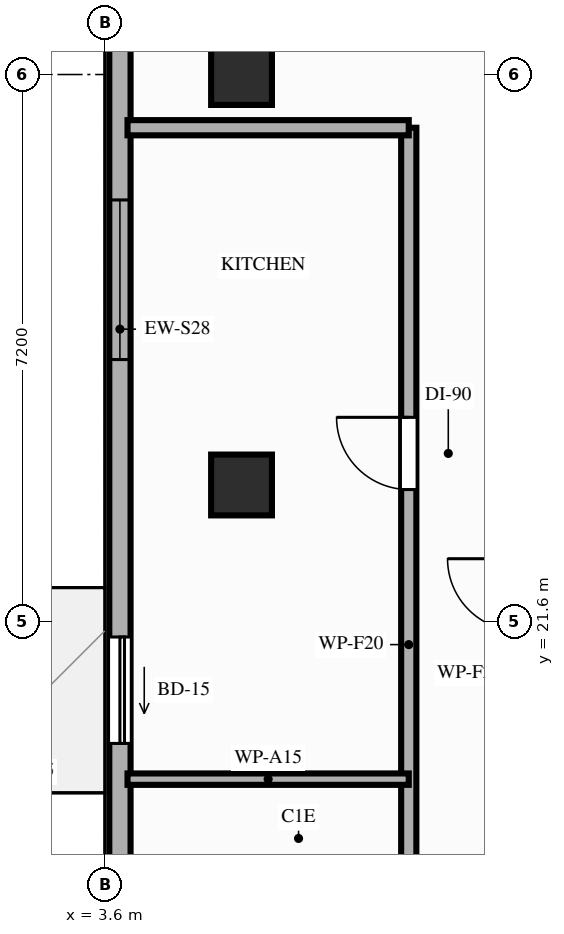
"""IFC4 building model, lengths in metres.
Left out: names, types, materials, properties, quantities, classifications, styles, units other than length and angle.
Written with IfcOpenShell. Run it as: python <this file> out.ifc"""

import sys

from ifc_helpers import new_model, si_unit, direction, frame, frame_2d, origin, origin_2d, place, context, subcontext, project, spatial, rectangle, extrude, element, fill, save


model = new_model("IFC4")
c1 = context("Model", 3, precision=1e-05, world=origin(), true_north=direction((0.0, 1.0)))
c2 = subcontext(c1, "Body", "Model", "MODEL_VIEW")
j1 = project(units=[si_unit("LENGTHUNIT", "METRE"), si_unit("PLANEANGLEUNIT", "RADIAN")], contexts=[c1])
p1 = place(None, origin())
s1 = spatial("IfcSite", under=j1, at=p1, CompositionType="ELEMENT")
p2 = place(p1, origin())
s2 = spatial("IfcBuilding", under=s1, at=p2, CompositionType="ELEMENT")
p3 = place(p2, frame((0.0, 0.0, 231.2)))
s3 = spatial("IfcBuildingStorey", under=s2, at=p3, CompositionType="ELEMENT", Elevation=231.2)
for number, where, z_axis, x_axis in (
    (1, (5.4, 23.4, 0.0), (0.0, 0.0, 1.0), (1.0, 0.0, 0.0)),
    (2, (5.4, 28.8, 0.0), (0.0, 0.0, 1.0), (1.0, 0.0, 0.0)),
):
    element("IfcColumn", number, at=place(p3, frame(where, z_axis=z_axis, x_axis=x_axis)), inside=s3, PredefinedType="COLUMN", context=c2, shape_type="SweptSolid", body=[
        extrude(rectangle(XDim=0.8, YDim=0.8, at=origin_2d()), origin(), (0.0, 0.0, 1.0), 3.2),
    ])
p4 = place(p3, frame((3.8, 42.1, 0.0), z_axis=(0.0, 0.0, 1.0), x_axis=(0.0, -1.0, 0.0)))
e3 = element("IfcWall", 3, at=p4, inside=s3, PredefinedType="STANDARD", context=c2, shape_type="SweptSolid", body=[
    extrude(rectangle(XDim=33.3, YDim=0.28, at=frame_2d((16.65, 0.0))), origin(), (0.0, 0.0, 1.0), 2.71),
])
p5 = place(p4, frame((20.7, 0.0, 0.0)))
e4 = element("IfcOpeningElement", 4, at=p5, cuts=e3, PredefinedType="OPENING", context=c2, shape_type="SweptSolid", body=[
    extrude(rectangle(XDim=1.4, YDim=2.1, at=frame_2d((0.7, 1.05))), frame((0.0, 0.15, 0.0), z_axis=(0.0, -1.0, 0.0), x_axis=(1.0, 0.0, 0.0)), (0.0, 0.0, 1.0), 0.3),
])
p6 = place(p4, frame((29.33, 0.0, 0.85)))
e5 = element("IfcOpeningElement", 5, at=p6, cuts=e3, PredefinedType="OPENING", context=c2, shape_type="SweptSolid", body=[
    extrude(rectangle(XDim=2.1, YDim=1.61, at=frame_2d((1.05, 0.805))), frame((0.0, 0.15, 0.0), z_axis=(0.0, -1.0, 0.0), x_axis=(1.0, 0.0, 0.0)), (0.0, 0.0, 1.0), 0.3),
])
p7 = place(p4, frame((24.04, 0.0, 0.85)))
e6 = element("IfcOpeningElement", 6, at=p7, cuts=e3, PredefinedType="OPENING", context=c2, shape_type="SweptSolid", body=[
    extrude(rectangle(XDim=2.1, YDim=1.61, at=frame_2d((1.05, 0.805))), frame((0.0, 0.15, 0.0), z_axis=(0.0, -1.0, 0.0), x_axis=(1.0, 0.0, 0.0)), (0.0, 0.0, 1.0), 0.3),
])
p8 = place(p4, frame((14.95, 0.0, 0.85)))
e7 = element("IfcOpeningElement", 7, at=p8, cuts=e3, PredefinedType="OPENING", context=c2, shape_type="SweptSolid", body=[
    extrude(rectangle(XDim=2.1, YDim=1.61, at=frame_2d((1.05, 0.805))), frame((0.0, 0.15, 0.0), z_axis=(0.0, -1.0, 0.0), x_axis=(1.0, 0.0, 0.0)), (0.0, 0.0, 1.0), 0.3),
])
p9 = place(p4, frame((9.75, 0.0, 0.85)))
e8 = element("IfcOpeningElement", 8, at=p9, cuts=e3, PredefinedType="OPENING", context=c2, shape_type="SweptSolid", body=[
    extrude(rectangle(XDim=2.1, YDim=1.61, at=frame_2d((1.05, 0.805))), frame((0.0, 0.15, 0.0), z_axis=(0.0, -1.0, 0.0), x_axis=(1.0, 0.0, 0.0)), (0.0, 0.0, 1.0), 0.3),
])
p10 = place(p4, frame((3.65, 0.0, 0.85)))
e9 = element("IfcOpeningElement", 9, at=p10, cuts=e3, PredefinedType="OPENING", context=c2, shape_type="SweptSolid", body=[
    extrude(rectangle(XDim=2.1, YDim=1.61, at=frame_2d((1.05, 0.805))), frame((0.0, 0.15, 0.0), z_axis=(0.0, -1.0, 0.0), x_axis=(1.0, 0.0, 0.0)), (0.0, 0.0, 1.0), 0.3),
])
p11 = place(p3, frame((7.6, 14.5, 0.0), z_axis=(0.0, 0.0, 1.0), x_axis=(0.0, 1.0, 0.0)))
e10 = element("IfcWall", 10, at=p11, inside=s3, PredefinedType="PARTITIONING", context=c2, shape_type="SweptSolid", body=[
    extrude(rectangle(XDim=13.6, YDim=0.2, at=frame_2d((6.8, 0.0))), origin(), (0.0, 0.0, 1.0), 2.56),
])
p12 = place(p11, frame((2.04, 0.0, 0.0)))
e11 = element("IfcOpeningElement", 11, at=p12, cuts=e10, PredefinedType="OPENING", context=c2, shape_type="SweptSolid", body=[
    extrude(rectangle(XDim=0.95, YDim=2.15, at=frame_2d((0.475, 1.075))), frame((0.0, 0.11, 0.0), z_axis=(0.0, -1.0, 0.0), x_axis=(1.0, 0.0, 0.0)), (0.0, 0.0, 1.0), 0.22),
])
p13 = place(p11, frame((8.84, 0.0, 0.0)))
e12 = element("IfcOpeningElement", 12, at=p13, cuts=e10, PredefinedType="OPENING", context=c2, shape_type="SweptSolid", body=[
    extrude(rectangle(XDim=0.95, YDim=2.15, at=frame_2d((0.475, 1.075))), frame((0.0, 0.11, 0.0), z_axis=(0.0, -1.0, 0.0), x_axis=(1.0, 0.0, 0.0)), (0.0, 0.0, 1.0), 0.22),
])
p14 = place(p3, frame((3.9, 28.1, 0.0), z_axis=(0.0, 0.0, 1.0), x_axis=(1.0, 0.0, 0.0)))
e13 = element("IfcWall", 13, at=p14, inside=s3, PredefinedType="PARTITIONING", context=c2, shape_type="SweptSolid", body=[
    extrude(rectangle(XDim=3.7, YDim=0.2, at=frame_2d((1.85, 0.0))), origin(), (0.0, 0.0, 1.0), 2.56),
])
p15 = place(p3, frame((3.9, 19.53, 0.0), z_axis=(0.0, 0.0, 1.0), x_axis=(1.0, 0.0, 0.0)))
e14 = element("IfcWall", 14, at=p15, inside=s3, PredefinedType="PARTITIONING", context=c2, shape_type="SweptSolid", body=[
    extrude(rectangle(XDim=3.7, YDim=0.15, at=frame_2d((1.85, 0.0))), origin(), (0.0, 0.0, 1.0), 2.56),
])
p16 = place(p5, origin())
e15 = element("IfcDoor", 15, at=p16, inside=s3, OperationType="SLIDING_TO_RIGHT", PredefinedType="DOOR", context=c2, shape_type="SweptSolid", body=[
    extrude(rectangle(XDim=1.4, YDim=2.1, at=frame_2d((0.7, 1.05))), frame((0.0, 0.025, 0.0), z_axis=(0.0, -1.0, 0.0), x_axis=(1.0, 0.0, 0.0)), (0.0, 0.0, 1.0), 0.05),
])
fill(e4, e15)
p17 = place(p8, origin())
e16 = element("IfcWindow", 16, at=p17, inside=s3, PartitioningType="SINGLE_PANEL", PredefinedType="WINDOW", context=c2, shape_type="SweptSolid", body=[
    extrude(rectangle(XDim=2.1, YDim=1.61, at=frame_2d((1.05, 0.805))), frame((0.0, 0.03, 0.0), z_axis=(0.0, -1.0, 0.0), x_axis=(1.0, 0.0, 0.0)), (0.0, 0.0, 1.0), 0.06),
])
fill(e7, e16)
p18 = place(p13, origin())
e17 = element("IfcDoor", 17, at=p18, inside=s3, OperationType="SINGLE_SWING_RIGHT", PredefinedType="DOOR", context=c2, shape_type="SweptSolid", body=[
    extrude(rectangle(XDim=0.95, YDim=2.15, at=frame_2d((0.475, 1.075))), frame((0.0, 0.025, 0.0), z_axis=(0.0, -1.0, 0.0), x_axis=(1.0, 0.0, 0.0)), (0.0, 0.0, 1.0), 0.05),
])
fill(e12, e17)
save(model, sys.argv[1])
